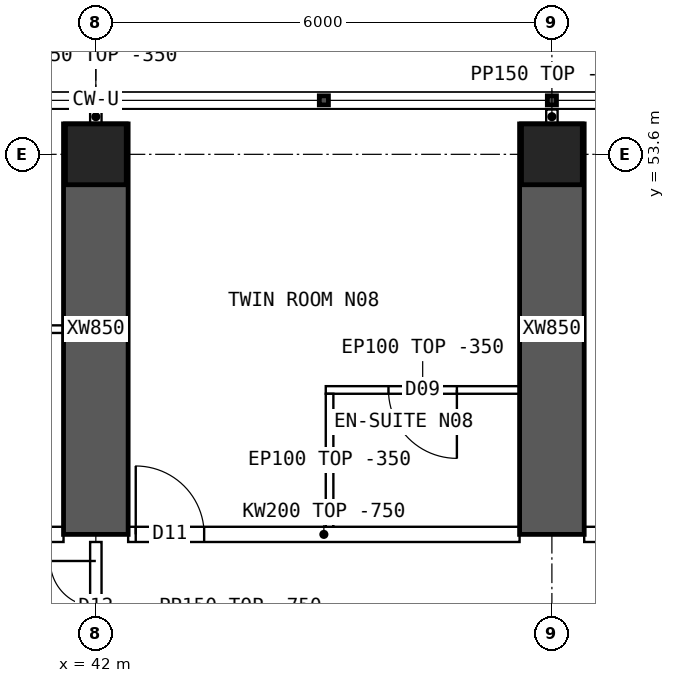
"""IFC4 building model, lengths in metres.
Left out: names, types, materials, properties, quantities, classifications, styles, units other than length and angle.
Written with IfcOpenShell. Run it as: python <this file> out.ifc"""

import sys

from ifc_helpers import new_model, si_unit, direction, frame, frame_2d, origin, origin_2d, place, context, subcontext, project, spatial, polyline, rectangle, hollow_rectangle, outline, extrude, element, fill, save


model = new_model("IFC4")
c1 = context("Model", 3, precision=1e-05, world=origin(), true_north=direction((0.0, 1.0)))
c2 = subcontext(c1, "Body", "Model", "MODEL_VIEW")
j1 = project(units=[si_unit("LENGTHUNIT", "METRE"), si_unit("PLANEANGLEUNIT", "RADIAN")], contexts=[c1])
p1 = place(None, origin())
s1 = spatial("IfcSite", under=j1, at=p1, CompositionType="ELEMENT")
p2 = place(p1, origin())
s2 = spatial("IfcBuilding", under=s1, at=p2, CompositionType="ELEMENT")
p3 = place(p2, frame((0.0, 0.0, 197.35)))
s3 = spatial("IfcBuildingStorey", under=s2, at=p3, CompositionType="ELEMENT", Elevation=197.35)
for number, where, z_axis, x_axis in (
    (1, (42.0, 53.6, 0.0), (0.0, 0.0, 1.0), (1.0, 0.0, 0.0)),
    (2, (48.0, 53.6, 0.0), (0.0, 0.0, 1.0), (1.0, 0.0, 0.0)),
):
    element("IfcColumn", number, at=place(p3, frame(where, z_axis=z_axis, x_axis=x_axis)), inside=s3, PredefinedType="COLUMN", context=c2, shape_type="SweptSolid", body=[
        extrude(hollow_rectangle(XDim=0.8, YDim=0.8, WallThickness=0.08, at=origin_2d()), origin(), (0.0, 0.0, 1.0), 3.75),
    ])
for number, where, z_axis, x_axis in (
    (3, (42.0, 48.6, 0.0), (0.0, 0.0, 1.0), (0.0, 1.0, 0.0)),
    (4, (48.0, 48.6, 0.0), (0.0, 0.0, 1.0), (0.0, 1.0, 0.0)),
):
    element("IfcWall", number, at=place(p3, frame(where, z_axis=z_axis, x_axis=x_axis)), inside=s3, PredefinedType="SHEAR", context=c2, shape_type="SweptSolid", body=[
        extrude(rectangle(XDim=5.4, YDim=0.85, at=frame_2d((2.7, 0.0))), origin(), (0.0, 0.0, 1.0), 3.75),
    ])
p4 = place(p3, frame((36.425, 48.6, 0.0), z_axis=(0.0, 0.0, 1.0), x_axis=(1.0, 0.0, 0.0)))
e5 = element("IfcWall", 5, at=p4, inside=s3, PredefinedType="SOLIDWALL", context=c2, shape_type="SweptSolid", body=[
    extrude(outline(polyline([(0.0, 0.0), (5.15, 0.0), (5.15, 3.0), (0.0, 3.0), (0.0, 0.0)])), frame((0.0, 0.1, 0.0), z_axis=(0.0, -1.0, 0.0), x_axis=(1.0, 0.0, 0.0)), (0.0, 0.0, 1.0), 0.2),
])
p5 = place(p4, frame((0.3, 0.0, 0.0)))
e6 = element("IfcOpeningElement", 6, at=p5, cuts=e5, PredefinedType="OPENING", context=c2, shape_type="SweptSolid", body=[
    extrude(rectangle(XDim=1.0, YDim=2.1, at=frame_2d((0.5, 1.05))), frame((0.0, 0.11, 0.0), z_axis=(0.0, -1.0, 0.0), x_axis=(1.0, 0.0, 0.0)), (0.0, 0.0, 1.0), 0.22),
])
p6 = place(p3, frame((42.425, 48.6, 0.0), z_axis=(0.0, 0.0, 1.0), x_axis=(1.0, 0.0, 0.0)))
e7 = element("IfcWall", 7, at=p6, inside=s3, PredefinedType="SOLIDWALL", context=c2, shape_type="SweptSolid", body=[
    extrude(outline(polyline([(0.0, 0.0), (5.15, 0.0), (5.15, 3.0), (0.0, 3.0), (0.0, 0.0)])), frame((0.0, 0.1, 0.0), z_axis=(0.0, -1.0, 0.0), x_axis=(1.0, 0.0, 0.0)), (0.0, 0.0, 1.0), 0.2),
])
p7 = place(p6, frame((0.1, 0.0, 0.0)))
e8 = element("IfcOpeningElement", 8, at=p7, cuts=e7, PredefinedType="OPENING", context=c2, shape_type="SweptSolid", body=[
    extrude(rectangle(XDim=0.9, YDim=2.1, at=frame_2d((0.45, 1.05))), frame((0.0, 0.11, 0.0), z_axis=(0.0, -1.0, 0.0), x_axis=(1.0, 0.0, 0.0)), (0.0, 0.0, 1.0), 0.22),
])
p8 = place(p3, frame((48.425, 48.6, 0.0), z_axis=(0.0, 0.0, 1.0), x_axis=(1.0, 0.0, 0.0)))
e9 = element("IfcWall", 9, at=p8, inside=s3, PredefinedType="SOLIDWALL", context=c2, shape_type="SweptSolid", body=[
    extrude(outline(polyline([(0.0, 0.0), (5.15, 0.0), (5.15, 3.0), (0.0, 3.0), (0.0, 0.0)])), frame((0.0, 0.1, 0.0), z_axis=(0.0, -1.0, 0.0), x_axis=(1.0, 0.0, 0.0)), (0.0, 0.0, 1.0), 0.2),
])
p9 = place(p8, frame((0.6, 0.0, 0.0)))
e10 = element("IfcOpeningElement", 10, at=p9, cuts=e9, PredefinedType="OPENING", context=c2, shape_type="SweptSolid", body=[
    extrude(rectangle(XDim=1.0, YDim=2.1, at=frame_2d((0.5, 1.05))), frame((0.0, 0.11, 0.0), z_axis=(0.0, -1.0, 0.0), x_axis=(1.0, 0.0, 0.0)), (0.0, 0.0, 1.0), 0.22),
])
p10 = place(p3, frame((38.925, 51.3, 0.0), z_axis=(0.0, 0.0, 1.0), x_axis=(1.0, 0.0, 0.0)))
e11 = element("IfcWall", 11, at=p10, inside=s3, PredefinedType="PARTITIONING", context=c2, shape_type="SweptSolid", body=[
    extrude(rectangle(XDim=2.65, YDim=0.1, at=frame_2d((1.325, 0.0))), origin(), (0.0, 0.0, 1.0), 3.4),
])
p11 = place(p3, frame((45.025, 50.5, 0.0), z_axis=(0.0, 0.0, 1.0), x_axis=(1.0, 0.0, 0.0)))
e12 = element("IfcWall", 12, at=p11, inside=s3, PredefinedType="PARTITIONING", context=c2, shape_type="SweptSolid", body=[
    extrude(rectangle(XDim=2.55, YDim=0.1, at=frame_2d((1.275, 0.0))), origin(), (0.0, 0.0, 1.0), 3.4),
])
p12 = place(p11, frame((0.825, 0.0, 0.0)))
e13 = element("IfcOpeningElement", 13, at=p12, cuts=e12, PredefinedType="OPENING", context=c2, shape_type="SweptSolid", body=[
    extrude(rectangle(XDim=0.9, YDim=2.1, at=frame_2d((0.45, 1.05))), frame((0.0, 0.06, 0.0), z_axis=(0.0, -1.0, 0.0), x_axis=(1.0, 0.0, 0.0)), (0.0, 0.0, 1.0), 0.12),
])
p13 = place(p3, frame((45.075, 50.45, 0.0), z_axis=(0.0, 0.0, 1.0), x_axis=(0.0, -1.0, 0.0)))
e14 = element("IfcWall", 14, at=p13, inside=s3, PredefinedType="PARTITIONING", context=c2, shape_type="SweptSolid", body=[
    extrude(outline(polyline([(0.0, 0.0), (1.75, 0.0), (1.75, 3.0), (1.702, 3.0), (1.7, 3.4), (0.0, 3.4), (0.0, 0.0)])), frame((0.0, 0.05, 0.0), z_axis=(0.0, -1.0, 0.0), x_axis=(1.0, 0.0, 0.0)), (0.0, 0.0, 1.0), 0.1),
])
p14 = place(p3, frame((42.0, 46.8, 0.0), z_axis=(0.0, 0.0, 1.0), x_axis=(0.0, 1.0, 0.0)))
e15 = element("IfcWall", 15, at=p14, inside=s3, PredefinedType="PARTITIONING", context=c2, shape_type="SweptSolid", body=[
    extrude(outline(polyline([(0.0, 0.0), (1.7, 0.0), (1.7, 3.0), (0.0, 3.0), (0.0, 0.0)])), frame((0.0, 0.075, 0.0), z_axis=(0.0, -1.0, 0.0), x_axis=(1.0, 0.0, 0.0)), (0.0, 0.0, 1.0), 0.15),
])
p15 = place(p14, frame((0.25, 0.0, 0.0)))
e16 = element("IfcOpeningElement", 16, at=p15, cuts=e15, PredefinedType="OPENING", context=c2, shape_type="SweptSolid", body=[
    extrude(rectangle(XDim=1.2, YDim=2.1, at=frame_2d((0.6, 1.05))), frame((0.0, 0.085, 0.0), z_axis=(0.0, -1.0, 0.0), x_axis=(1.0, 0.0, 0.0)), (0.0, 0.0, 1.0), 0.17),
])
for number, where, z_axis, x_axis in (
    (17, (42.0, 54.0, 0.0), (0.0, 0.0, 1.0), (0.0, 1.0, 0.0)),
    (18, (48.0, 54.0, 0.0), (0.0, 0.0, 1.0), (0.0, 1.0, 0.0)),
):
    element("IfcWall", number, at=place(p3, frame(where, z_axis=z_axis, x_axis=x_axis)), inside=s3, PredefinedType="PARTITIONING", context=c2, shape_type="SweptSolid", body=[
        extrude(rectangle(XDim=0.19, YDim=0.15, at=frame_2d((0.095, 0.0))), origin(), (0.0, 0.0, 1.0), 3.4),
    ])
p16 = place(p12, origin())
e19 = element("IfcDoor", 19, at=p16, inside=s3, OperationType="SINGLE_SWING_RIGHT", PredefinedType="DOOR", context=c2, shape_type="SweptSolid", body=[
    extrude(rectangle(XDim=0.9, YDim=2.1, at=frame_2d((0.45, 1.05))), frame((0.0, 0.025, 0.0), z_axis=(0.0, -1.0, 0.0), x_axis=(1.0, 0.0, 0.0)), (0.0, 0.0, 1.0), 0.05),
])
fill(e13, e19)
p17 = place(p7, origin())
e20 = element("IfcDoor", 20, at=p17, inside=s3, OperationType="SINGLE_SWING_LEFT", PredefinedType="DOOR", context=c2, shape_type="SweptSolid", body=[
    extrude(rectangle(XDim=0.9, YDim=2.1, at=frame_2d((0.45, 1.05))), frame((0.0, 0.025, 0.0), z_axis=(0.0, -1.0, 0.0), x_axis=(1.0, 0.0, 0.0)), (0.0, 0.0, 1.0), 0.05),
])
fill(e8, e20)
p18 = place(p15, origin())
e21 = element("IfcDoor", 21, at=p18, inside=s3, OperationType="DOUBLE_DOOR_SINGLE_SWING", PredefinedType="DOOR", context=c2, shape_type="SweptSolid", body=[
    extrude(rectangle(XDim=1.2, YDim=2.1, at=frame_2d((0.6, 1.05))), frame((0.0, 0.025, 0.0), z_axis=(0.0, -1.0, 0.0), x_axis=(1.0, 0.0, 0.0)), (0.0, 0.0, 1.0), 0.05),
])
fill(e16, e21)
save(model, sys.argv[1])
